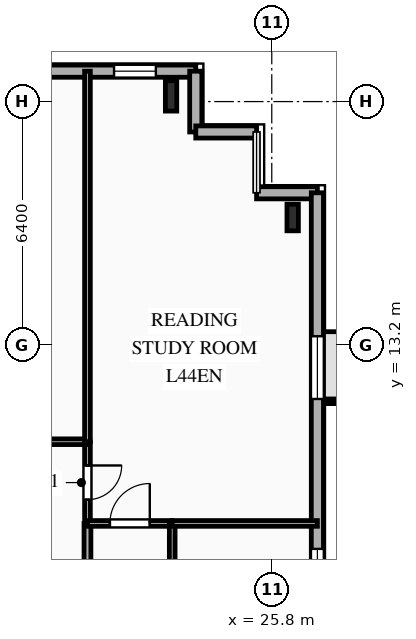
"""IFC4 building model, lengths in metres.
Left out: names, types, materials, properties, quantities, classifications, styles, units other than length and angle.
Written with IfcOpenShell. Run it as: python <this file> out.ifc"""

import sys

from ifc_helpers import new_model, si_unit, direction, frame, frame_2d, origin, origin_2d, place, context, subcontext, project, spatial, rectangle, i_section, extrude, element, fill, save


model = new_model("IFC4")
c1 = context("Model", 3, precision=1e-05, world=origin(), true_north=direction((0.0, 1.0)))
c2 = subcontext(c1, "Body", "Model", "MODEL_VIEW")
j1 = project(units=[si_unit("LENGTHUNIT", "METRE"), si_unit("PLANEANGLEUNIT", "RADIAN")], contexts=[c1])
p1 = place(None, origin())
s1 = spatial("IfcSite", under=j1, at=p1, CompositionType="ELEMENT")
p2 = place(p1, origin())
s2 = spatial("IfcBuilding", under=s1, at=p2, CompositionType="ELEMENT")
p3 = place(p2, frame((0.0, 0.0, 157.8)))
s3 = spatial("IfcBuildingStorey", under=s2, at=p3, CompositionType="ELEMENT", Elevation=157.8)
p4 = place(p3, frame((23.15, 19.75, 0.0), z_axis=(0.0, 0.0, 1.0), x_axis=(1.0, 0.0, 0.0)))
e1 = element("IfcColumn", 1, at=p4, inside=s3, PredefinedType="COLUMN", context=c2, shape_type="SweptSolid", body=[
    extrude(i_section(OverallWidth=0.3, OverallDepth=0.8, WebThickness=0.018, FlangeThickness=0.033, FilletRadius=0.03, at=origin_2d()), origin(), (0.0, 0.0, 1.0), 3.35),
])
p5 = place(p3, frame((26.35, 16.55, 0.0), z_axis=(0.0, 0.0, 1.0), x_axis=(1.0, 0.0, 0.0)))
e2 = element("IfcColumn", 2, at=p5, inside=s3, PredefinedType="COLUMN", context=c2, shape_type="SweptSolid", body=[
    extrude(i_section(OverallWidth=0.3, OverallDepth=0.7, WebThickness=0.017, FlangeThickness=0.032, FilletRadius=0.027, at=origin_2d()), origin(), (0.0, 0.0, 1.0), 3.35),
])
p6 = place(p3, frame((-25.8, 20.4, 0.0), z_axis=(0.0, 0.0, 1.0), x_axis=(1.0, 0.0, 0.0)))
e3 = element("IfcWall", 3, at=p6, inside=s3, PredefinedType="SOLIDWALL", context=c2, shape_type="SweptSolid", body=[
    extrude(rectangle(XDim=49.6, YDim=0.32, at=frame_2d((24.8, 0.0))), origin(), (0.0, 0.0, 1.0), 3.04),
])
p7 = place(p6, frame((2.135, 0.0, 0.85)))
e4 = element("IfcOpeningElement", 4, at=p7, cuts=e3, PredefinedType="OPENING", context=c2, shape_type="SweptSolid", body=[
    extrude(rectangle(XDim=1.65, YDim=1.85, at=frame_2d((0.825, 0.925))), frame((0.0, 0.17, 0.0), z_axis=(0.0, -1.0, 0.0), x_axis=(1.0, 0.0, 0.0)), (0.0, 0.0, 1.0), 0.34),
])
p8 = place(p6, frame((6.706, 0.0, 0.85)))
e5 = element("IfcOpeningElement", 5, at=p8, cuts=e3, PredefinedType="OPENING", context=c2, shape_type="SweptSolid", body=[
    extrude(rectangle(XDim=1.65, YDim=1.85, at=frame_2d((0.825, 0.925))), frame((0.0, 0.17, 0.0), z_axis=(0.0, -1.0, 0.0), x_axis=(1.0, 0.0, 0.0)), (0.0, 0.0, 1.0), 0.34),
])
p9 = place(p6, frame((14.966, 0.0, 0.85)))
e6 = element("IfcOpeningElement", 6, at=p9, cuts=e3, PredefinedType="OPENING", context=c2, shape_type="SweptSolid", body=[
    extrude(rectangle(XDim=1.5, YDim=1.85, at=frame_2d((0.75, 0.925))), frame((0.0, 0.17, 0.0), z_axis=(0.0, -1.0, 0.0), x_axis=(1.0, 0.0, 0.0)), (0.0, 0.0, 1.0), 0.34),
])
p10 = place(p6, frame((20.74, 0.0, 0.85)))
e7 = element("IfcOpeningElement", 7, at=p10, cuts=e3, PredefinedType="OPENING", context=c2, shape_type="SweptSolid", body=[
    extrude(rectangle(XDim=2.2, YDim=1.85, at=frame_2d((1.1, 0.925))), frame((0.0, 0.17, 0.0), z_axis=(0.0, -1.0, 0.0), x_axis=(1.0, 0.0, 0.0)), (0.0, 0.0, 1.0), 0.34),
])
p11 = place(p6, frame((27.74, 0.0, 0.85)))
e8 = element("IfcOpeningElement", 8, at=p11, cuts=e3, PredefinedType="OPENING", context=c2, shape_type="SweptSolid", body=[
    extrude(rectangle(XDim=2.2, YDim=1.85, at=frame_2d((1.1, 0.925))), frame((0.0, 0.17, 0.0), z_axis=(0.0, -1.0, 0.0), x_axis=(1.0, 0.0, 0.0)), (0.0, 0.0, 1.0), 0.34),
])
p12 = place(p6, frame((34.7, 0.0, 0.85)))
e9 = element("IfcOpeningElement", 9, at=p12, cuts=e3, PredefinedType="OPENING", context=c2, shape_type="SweptSolid", body=[
    extrude(rectangle(XDim=2.2, YDim=1.85, at=frame_2d((1.1, 0.925))), frame((0.0, 0.17, 0.0), z_axis=(0.0, -1.0, 0.0), x_axis=(1.0, 0.0, 0.0)), (0.0, 0.0, 1.0), 0.34),
])
p13 = place(p6, frame((42.215, 0.0, 0.85)))
e10 = element("IfcOpeningElement", 10, at=p13, cuts=e3, PredefinedType="OPENING", context=c2, shape_type="SweptSolid", body=[
    extrude(rectangle(XDim=1.65, YDim=1.85, at=frame_2d((0.825, 0.925))), frame((0.0, 0.17, 0.0), z_axis=(0.0, -1.0, 0.0), x_axis=(1.0, 0.0, 0.0)), (0.0, 0.0, 1.0), 0.34),
])
p14 = place(p6, frame((47.45, 0.0, 0.85)))
e11 = element("IfcOpeningElement", 11, at=p14, cuts=e3, PredefinedType="OPENING", context=c2, shape_type="SweptSolid", body=[
    extrude(rectangle(XDim=1.1, YDim=1.85, at=frame_2d((0.55, 0.925))), frame((0.0, 0.17, 0.0), z_axis=(0.0, -1.0, 0.0), x_axis=(1.0, 0.0, 0.0)), (0.0, 0.0, 1.0), 0.34),
])
for number, where, z_axis, x_axis in (
    (12, (23.8, 20.4, 0.0), (0.0, 0.0, 1.0), (0.0, -1.0, 0.0)),
    (13, (23.8, 18.8, 0.0), (0.0, 0.0, 1.0), (1.0, 0.0, 0.0)),
):
    element("IfcWall", number, at=place(p3, frame(where, z_axis=z_axis, x_axis=x_axis)), inside=s3, PredefinedType="SOLIDWALL", context=c2, shape_type="SweptSolid", body=[
        extrude(rectangle(XDim=1.6, YDim=0.32, at=frame_2d((0.8, 0.0))), origin(), (0.0, 0.0, 1.0), 3.04),
    ])
p15 = place(p3, frame((25.4, 17.2, 0.0), z_axis=(0.0, 0.0, 1.0), x_axis=(1.0, 0.0, 0.0)))
e14 = element("IfcWall", 14, at=p15, inside=s3, PredefinedType="SOLIDWALL", context=c2, shape_type="SweptSolid", body=[
    extrude(rectangle(XDim=1.6, YDim=0.32, at=frame_2d((0.8, 0.0))), origin(), (0.0, 0.0, 1.0), 3.04),
])
p16 = place(p3, frame((27.0, 17.2, 0.0), z_axis=(0.0, 0.0, 1.0), x_axis=(0.0, -1.0, 0.0)))
e15 = element("IfcWall", 15, at=p16, inside=s3, PredefinedType="SOLIDWALL", context=c2, shape_type="SweptSolid", body=[
    extrude(rectangle(XDim=29.6, YDim=0.32, at=frame_2d((14.8, 0.0))), origin(), (0.0, 0.0, 1.0), 3.04),
])
p17 = place(p16, frame((3.775, 0.0, 0.85)))
e16 = element("IfcOpeningElement", 16, at=p17, cuts=e15, PredefinedType="OPENING", context=c2, shape_type="SweptSolid", body=[
    extrude(rectangle(XDim=1.65, YDim=1.85, at=frame_2d((0.825, 0.925))), frame((0.0, 0.17, 0.0), z_axis=(0.0, -1.0, 0.0), x_axis=(1.0, 0.0, 0.0)), (0.0, 0.0, 1.0), 0.34),
])
p18 = place(p16, frame((9.37, 0.0, 0.85)))
e17 = element("IfcOpeningElement", 17, at=p18, cuts=e15, PredefinedType="OPENING", context=c2, shape_type="SweptSolid", body=[
    extrude(rectangle(XDim=1.5, YDim=1.85, at=frame_2d((0.75, 0.925))), frame((0.0, 0.17, 0.0), z_axis=(0.0, -1.0, 0.0), x_axis=(1.0, 0.0, 0.0)), (0.0, 0.0, 1.0), 0.34),
])
p19 = place(p16, frame((12.25, 0.0, 0.85)))
e18 = element("IfcOpeningElement", 18, at=p19, cuts=e15, PredefinedType="OPENING", context=c2, shape_type="SweptSolid", body=[
    extrude(rectangle(XDim=1.5, YDim=1.85, at=frame_2d((0.75, 0.925))), frame((0.0, 0.17, 0.0), z_axis=(0.0, -1.0, 0.0), x_axis=(1.0, 0.0, 0.0)), (0.0, 0.0, 1.0), 0.34),
])
p20 = place(p16, frame((15.05, 0.0, 0.85)))
e19 = element("IfcOpeningElement", 19, at=p20, cuts=e15, PredefinedType="OPENING", context=c2, shape_type="SweptSolid", body=[
    extrude(rectangle(XDim=1.5, YDim=1.85, at=frame_2d((0.75, 0.925))), frame((0.0, 0.17, 0.0), z_axis=(0.0, -1.0, 0.0), x_axis=(1.0, 0.0, 0.0)), (0.0, 0.0, 1.0), 0.34),
])
p21 = place(p16, frame((17.865, 0.0, 0.85)))
e20 = element("IfcOpeningElement", 20, at=p21, cuts=e15, PredefinedType="OPENING", context=c2, shape_type="SweptSolid", body=[
    extrude(rectangle(XDim=1.95, YDim=1.85, at=frame_2d((0.975, 0.925))), frame((0.0, 0.17, 0.0), z_axis=(0.0, -1.0, 0.0), x_axis=(1.0, 0.0, 0.0)), (0.0, 0.0, 1.0), 0.34),
])
p22 = place(p16, frame((25.175, 0.0, 0.85)))
e21 = element("IfcOpeningElement", 21, at=p22, cuts=e15, PredefinedType="OPENING", context=c2, shape_type="SweptSolid", body=[
    extrude(rectangle(XDim=1.65, YDim=1.85, at=frame_2d((0.825, 0.925))), frame((0.0, 0.17, 0.0), z_axis=(0.0, -1.0, 0.0), x_axis=(1.0, 0.0, 0.0)), (0.0, 0.0, 1.0), 0.34),
])
p23 = place(p3, frame((20.95, 10.65, 0.0), z_axis=(0.0, 0.0, 1.0), x_axis=(0.0, -1.0, 0.0)))
e22 = element("IfcWall", 22, at=p23, inside=s3, PredefinedType="PARTITIONING", context=c2, shape_type="SweptSolid", body=[
    extrude(rectangle(XDim=2.15, YDim=0.15, at=frame_2d((1.075, 0.0))), origin(), (0.0, 0.0, 1.0), 3.04),
])
p24 = place(p23, frame((0.625, 0.0, 0.0)))
e23 = element("IfcOpeningElement", 23, at=p24, cuts=e22, PredefinedType="OPENING", context=c2, shape_type="SweptSolid", body=[
    extrude(rectangle(XDim=0.9, YDim=2.1, at=frame_2d((0.45, 1.05))), frame((0.0, 0.085, 0.0), z_axis=(0.0, -1.0, 0.0), x_axis=(1.0, 0.0, 0.0)), (0.0, 0.0, 1.0), 0.17),
])
p25 = place(p3, frame((13.467, 10.65, 0.0), z_axis=(0.0, 0.0, 1.0), x_axis=(1.0, 0.0, 0.0)))
e24 = element("IfcWall", 24, at=p25, inside=s3, PredefinedType="PARTITIONING", context=c2, shape_type="SweptSolid", body=[
    extrude(rectangle(XDim=7.483, YDim=0.15, at=frame_2d((3.741, 0.0))), origin(), (0.0, 0.0, 1.0), 3.04),
])
p26 = place(p25, frame((1.239, 0.0, 0.0)))
e25 = element("IfcOpeningElement", 25, at=p26, cuts=e24, PredefinedType="OPENING", context=c2, shape_type="SweptSolid", body=[
    extrude(rectangle(XDim=1.05, YDim=2.15, at=frame_2d((0.525, 1.075))), frame((0.0, 0.085, 0.0), z_axis=(0.0, -1.0, 0.0), x_axis=(1.0, 0.0, 0.0)), (0.0, 0.0, 1.0), 0.17),
])
p27 = place(p3, frame((20.95, 8.5, 0.0), z_axis=(0.0, 0.0, 1.0), x_axis=(0.0, -1.0, 0.0)))
e26 = element("IfcWall", 26, at=p27, inside=s3, PredefinedType="PARTITIONING", context=c2, shape_type="SweptSolid", body=[
    extrude(rectangle(XDim=14.1, YDim=0.18, at=frame_2d((7.05, 0.0))), origin(), (0.0, 0.0, 1.0), 3.04),
])
p28 = place(p27, frame((8.042, 0.0, 0.0)))
e27 = element("IfcOpeningElement", 27, at=p28, cuts=e26, PredefinedType="OPENING", context=c2, shape_type="SweptSolid", body=[
    extrude(rectangle(XDim=1.0, YDim=2.15, at=frame_2d((0.5, 1.075))), frame((0.0, 0.1, 0.0), z_axis=(0.0, -1.0, 0.0), x_axis=(1.0, 0.0, 0.0)), (0.0, 0.0, 1.0), 0.2),
])
p29 = place(p3, frame((20.95, 8.5, 0.0), z_axis=(0.0, 0.0, 1.0), x_axis=(1.0, 0.0, 0.0)))
e28 = element("IfcWall", 28, at=p29, inside=s3, PredefinedType="PARTITIONING", context=c2, shape_type="SweptSolid", body=[
    extrude(rectangle(XDim=2.23, YDim=0.15, at=frame_2d((1.115, 0.0))), origin(), (0.0, 0.0, 1.0), 3.04),
])
p30 = place(p29, frame((0.59, 0.0, 0.0)))
e29 = element("IfcOpeningElement", 29, at=p30, cuts=e28, PredefinedType="OPENING", context=c2, shape_type="SweptSolid", body=[
    extrude(rectangle(XDim=1.05, YDim=2.15, at=frame_2d((0.525, 1.075))), frame((0.0, 0.085, 0.0), z_axis=(0.0, -1.0, 0.0), x_axis=(1.0, 0.0, 0.0)), (0.0, 0.0, 1.0), 0.17),
])
p31 = place(p3, frame((23.18, 8.5, 0.0), z_axis=(0.0, 0.0, 1.0), x_axis=(0.0, -1.0, 0.0)))
e30 = element("IfcWall", 30, at=p31, inside=s3, PredefinedType="PARTITIONING", context=c2, shape_type="SweptSolid", body=[
    extrude(rectangle(XDim=2.82, YDim=0.15, at=frame_2d((1.41, 0.0))), origin(), (0.0, 0.0, 1.0), 3.04),
])
p32 = place(p31, frame((1.201, 0.0, 0.0)))
e31 = element("IfcOpeningElement", 31, at=p32, cuts=e30, PredefinedType="OPENING", context=c2, shape_type="SweptSolid", body=[
    extrude(rectangle(XDim=0.95, YDim=2.1, at=frame_2d((0.475, 1.05))), frame((0.0, 0.085, 0.0), z_axis=(0.0, -1.0, 0.0), x_axis=(1.0, 0.0, 0.0)), (0.0, 0.0, 1.0), 0.17),
])
p33 = place(p3, frame((27.0, 8.5, 0.0), z_axis=(0.0, 0.0, 1.0), x_axis=(-1.0, 0.0, 0.0)))
e32 = element("IfcWall", 32, at=p33, inside=s3, PredefinedType="PARTITIONING", context=c2, shape_type="SweptSolid", body=[
    extrude(rectangle(XDim=3.82, YDim=0.15, at=frame_2d((1.91, 0.0))), origin(), (0.0, 0.0, 1.0), 3.04),
])
p34 = place(p3, frame((20.95, 10.65, 0.0), z_axis=(0.0, 0.0, 1.0), x_axis=(0.0, 1.0, 0.0)))
e33 = element("IfcWall", 33, at=p34, inside=s3, PredefinedType="PARTITIONING", context=c2, shape_type="SweptSolid", body=[
    extrude(rectangle(XDim=9.75, YDim=0.15, at=frame_2d((4.875, 0.0))), origin(), (0.0, 0.0, 1.0), 2.525),
])
p35 = place(p14, origin())
e34 = element("IfcWindow", 34, at=p35, inside=s3, PartitioningType="SINGLE_PANEL", PredefinedType="WINDOW", context=c2, shape_type="SweptSolid", body=[
    extrude(rectangle(XDim=1.1, YDim=1.85, at=frame_2d((0.55, 0.925))), frame((0.0, 0.03, 0.0), z_axis=(0.0, -1.0, 0.0), x_axis=(1.0, 0.0, 0.0)), (0.0, 0.0, 1.0), 0.06),
])
fill(e11, e34)
p36 = place(p17, origin())
e35 = element("IfcWindow", 35, at=p36, inside=s3, PartitioningType="SINGLE_PANEL", PredefinedType="WINDOW", context=c2, shape_type="SweptSolid", body=[
    extrude(rectangle(XDim=1.65, YDim=1.85, at=frame_2d((0.825, 0.925))), frame((0.0, 0.03, 0.0), z_axis=(0.0, -1.0, 0.0), x_axis=(1.0, 0.0, 0.0)), (0.0, 0.0, 1.0), 0.06),
])
fill(e16, e35)
p37 = place(p18, origin())
e36 = element("IfcWindow", 36, at=p37, inside=s3, PartitioningType="SINGLE_PANEL", PredefinedType="WINDOW", context=c2, shape_type="SweptSolid", body=[
    extrude(rectangle(XDim=1.5, YDim=1.85, at=frame_2d((0.75, 0.925))), frame((0.0, 0.03, 0.0), z_axis=(0.0, -1.0, 0.0), x_axis=(1.0, 0.0, 0.0)), (0.0, 0.0, 1.0), 0.06),
])
fill(e17, e36)
p38 = place(p24, origin())
e37 = element("IfcDoor", 37, at=p38, inside=s3, OperationType="SINGLE_SWING_LEFT", PredefinedType="DOOR", context=c2, shape_type="SweptSolid", body=[
    extrude(rectangle(XDim=0.9, YDim=2.1, at=frame_2d((0.45, 1.05))), frame((0.0, 0.025, 0.0), z_axis=(0.0, -1.0, 0.0), x_axis=(1.0, 0.0, 0.0)), (0.0, 0.0, 1.0), 0.05),
])
fill(e23, e37)
p39 = place(p30, origin())
e38 = element("IfcDoor", 38, at=p39, inside=s3, OperationType="SINGLE_SWING_RIGHT", PredefinedType="DOOR", context=c2, shape_type="SweptSolid", body=[
    extrude(rectangle(XDim=1.05, YDim=2.15, at=frame_2d((0.525, 1.075))), frame((0.0, 0.025, 0.0), z_axis=(0.0, -1.0, 0.0), x_axis=(1.0, 0.0, 0.0)), (0.0, 0.0, 1.0), 0.05),
])
fill(e29, e38)
save(model, sys.argv[1])
